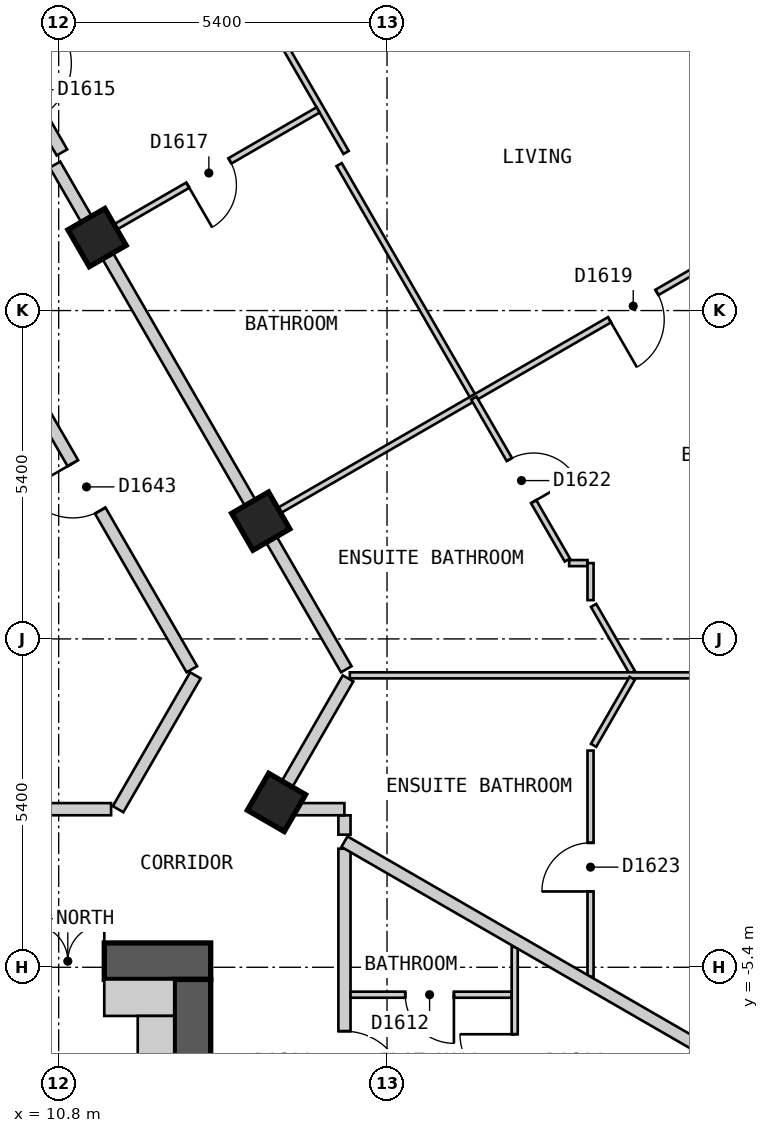
"""IFC4 building model, lengths in metres.
Left out: names, types, materials, properties, quantities, classifications, styles, units other than length and angle.
Written with IfcOpenShell. Run it as: python <this file> out.ifc"""

import sys

from ifc_helpers import new_model, si_unit, direction, frame, frame_2d, origin, origin_2d, place, context, subcontext, project, spatial, polyline, rectangle, outline, extrude, element, fill, save


model = new_model("IFC4")
c1 = context("Model", 3, precision=1e-05, world=origin(), true_north=direction((0.0, 1.0)))
c2 = subcontext(c1, "Body", "Model", "MODEL_VIEW")
j1 = project(units=[si_unit("LENGTHUNIT", "METRE"), si_unit("PLANEANGLEUNIT", "RADIAN")], contexts=[c1])
p1 = place(None, origin())
s1 = spatial("IfcSite", under=j1, at=p1, CompositionType="ELEMENT")
p2 = place(p1, origin())
s2 = spatial("IfcBuilding", under=s1, at=p2, CompositionType="ELEMENT")
p3 = place(p2, frame((0.0, 0.0, 163.2)))
s3 = spatial("IfcBuildingStorey", under=s2, at=p3, CompositionType="ELEMENT", Elevation=163.2)
for number, where, z_axis, x_axis in (
    (1, (14.382, -2.689, 0.0), (0.0, 0.0, 1.0), (0.5, 0.866, 0.0)),
    (2, (14.123, 1.937, 0.0), (0.0, 0.0, 1.0), (-0.5, 0.866, 0.0)),
    (3, (11.431, 6.6, 0.0), (0.0, 0.0, 1.0), (-0.5, 0.866, 0.0)),
):
    element("IfcColumn", number, at=place(p3, frame(where, z_axis=z_axis, x_axis=x_axis)), inside=s3, PredefinedType="COLUMN", context=c2, shape_type="SweptSolid", body=[
        extrude(rectangle(XDim=0.7, YDim=0.7, at=origin_2d()), origin(), (0.0, 0.0, 1.0), 3.0),
    ])
p4 = place(p3, frame((-13.3, -5.3, 0.0), z_axis=(0.0, 0.0, 1.0), x_axis=(1.0, 0.0, 0.0)))
e4 = element("IfcWall", 4, at=p4, inside=s3, PredefinedType="SHEAR", context=c2, shape_type="SweptSolid", body=[
    extrude(rectangle(XDim=26.6, YDim=0.6, at=frame_2d((13.3, 0.0))), origin(), (0.0, 0.0, 1.0), 2.7),
])
p5 = place(p4, frame((23.65, 0.0, 0.0)))
e5 = element("IfcOpeningElement", 5, at=p5, cuts=e4, PredefinedType="OPENING", context=c2, shape_type="SweptSolid", body=[
    extrude(rectangle(XDim=1.2, YDim=2.1, at=frame_2d((0.6, 1.05))), frame((0.0, 0.31, 0.0), z_axis=(0.0, -1.0, 0.0), x_axis=(1.0, 0.0, 0.0)), (0.0, 0.0, 1.0), 0.62),
])
p6 = place(p3, frame((13.0, -18.4, 0.0), z_axis=(0.0, 0.0, 1.0), x_axis=(0.0, 1.0, 0.0)))
e6 = element("IfcWall", 6, at=p6, inside=s3, PredefinedType="SHEAR", context=c2, shape_type="SweptSolid", body=[
    extrude(rectangle(XDim=12.8, YDim=0.6, at=frame_2d((6.4, 0.0))), origin(), (0.0, 0.0, 1.0), 2.7),
])
p7 = place(p3, frame((15.631, -21.025, 0.0), z_axis=(0.0, 0.0, 1.0), x_axis=(0.500018670445, 0.86601462413, 0.0)))
e7 = element("IfcWall", 7, at=p7, inside=s3, PredefinedType="SOLIDWALL", context=c2, shape_type="SweptSolid", body=[
    extrude(outline(polyline([(0.0, -0.15), (20.785, -0.15), (20.705, 0.15), (0.08, 0.15), (0.0, -0.15)])), origin(), (0.0, 0.0, 1.0), 2.7),
])
p8 = place(p7, frame((2.346, 0.0, 0.15)))
e8 = element("IfcOpeningElement", 8, at=p8, cuts=e7, PredefinedType="OPENING", context=c2, shape_type="SweptSolid", body=[
    extrude(rectangle(XDim=1.5, YDim=2.1, at=frame_2d((0.75, 1.05))), frame((0.0, 0.16, 0.0), z_axis=(0.0, -1.0, 0.0), x_axis=(1.0, 0.0, 0.0)), (0.0, 0.0, 1.0), 0.32),
])
p9 = place(p7, frame((7.21, 0.0, 0.15)))
e9 = element("IfcOpeningElement", 9, at=p9, cuts=e7, PredefinedType="OPENING", context=c2, shape_type="SweptSolid", body=[
    extrude(rectangle(XDim=1.5, YDim=2.1, at=frame_2d((0.75, 1.05))), frame((0.0, 0.16, 0.0), z_axis=(0.0, -1.0, 0.0), x_axis=(1.0, 0.0, 0.0)), (0.0, 0.0, 1.0), 0.32),
])
p10 = place(p7, frame((12.073, 0.0, 0.15)))
e10 = element("IfcOpeningElement", 10, at=p10, cuts=e7, PredefinedType="OPENING", context=c2, shape_type="SweptSolid", body=[
    extrude(rectangle(XDim=1.5, YDim=2.1, at=frame_2d((0.75, 1.05))), frame((0.0, 0.16, 0.0), z_axis=(0.0, -1.0, 0.0), x_axis=(1.0, 0.0, 0.0)), (0.0, 0.0, 1.0), 0.32),
])
p11 = place(p7, frame((16.938, 0.0, 0.15)))
e11 = element("IfcOpeningElement", 11, at=p11, cuts=e7, PredefinedType="OPENING", context=c2, shape_type="SweptSolid", body=[
    extrude(rectangle(XDim=1.5, YDim=2.1, at=frame_2d((0.75, 1.05))), frame((0.0, 0.16, 0.0), z_axis=(0.0, -1.0, 0.0), x_axis=(1.0, 0.0, 0.0)), (0.0, 0.0, 1.0), 0.32),
])
p12 = place(p3, frame((26.024, 1.825, 0.0), z_axis=(0.0, 0.0, 1.0), x_axis=(-0.500010537973, 0.866019319597, 0.0)))
e12 = element("IfcWall", 12, at=p12, inside=s3, PredefinedType="SOLIDWALL", context=c2, shape_type="SweptSolid", body=[
    extrude(outline(polyline([(0.0, -0.15), (22.863, -0.15), (22.783, 0.15), (0.08, 0.15), (0.0, -0.15)])), origin(), (0.0, 0.0, 1.0), 2.7),
])
p13 = place(p12, frame((2.606, 0.0, 0.15)))
e13 = element("IfcOpeningElement", 13, at=p13, cuts=e12, PredefinedType="OPENING", context=c2, shape_type="SweptSolid", body=[
    extrude(rectangle(XDim=1.5, YDim=2.1, at=frame_2d((0.75, 1.05))), frame((0.0, 0.16, 0.0), z_axis=(0.0, -1.0, 0.0), x_axis=(1.0, 0.0, 0.0)), (0.0, 0.0, 1.0), 0.32),
])
p14 = place(p12, frame((7.99, 0.0, 0.15)))
e14 = element("IfcOpeningElement", 14, at=p14, cuts=e12, PredefinedType="OPENING", context=c2, shape_type="SweptSolid", body=[
    extrude(rectangle(XDim=1.5, YDim=2.1, at=frame_2d((0.75, 1.05))), frame((0.0, 0.16, 0.0), z_axis=(0.0, -1.0, 0.0), x_axis=(1.0, 0.0, 0.0)), (0.0, 0.0, 1.0), 0.32),
])
p15 = place(p12, frame((13.373, 0.0, 0.15)))
e15 = element("IfcOpeningElement", 15, at=p15, cuts=e12, PredefinedType="OPENING", context=c2, shape_type="SweptSolid", body=[
    extrude(rectangle(XDim=1.5, YDim=2.1, at=frame_2d((0.75, 1.05))), frame((0.0, 0.16, 0.0), z_axis=(0.0, -1.0, 0.0), x_axis=(1.0, 0.0, 0.0)), (0.0, 0.0, 1.0), 0.32),
])
p16 = place(p12, frame((18.758, 0.0, 0.15)))
e16 = element("IfcOpeningElement", 16, at=p16, cuts=e12, PredefinedType="OPENING", context=c2, shape_type="SweptSolid", body=[
    extrude(rectangle(XDim=1.5, YDim=2.1, at=frame_2d((0.75, 1.05))), frame((0.0, 0.16, 0.0), z_axis=(0.0, -1.0, 0.0), x_axis=(1.0, 0.0, 0.0)), (0.0, 0.0, 1.0), 0.32),
])
p17 = place(p3, frame((9.526, 5.5, 0.0), z_axis=(0.0, 0.0, 1.0), x_axis=(0.500062092869, -0.865989551482, 0.0)))
e17 = element("IfcWall", 17, at=p17, inside=s3, PredefinedType="PARTITIONING", context=c2, shape_type="SweptSolid", body=[
    extrude(rectangle(XDim=6.927, YDim=0.2, at=frame_2d((3.464, 0.0))), origin(), (0.0, 0.0, 1.0), 2.7),
])
p18 = place(p17, frame((3.014, 0.0, 0.0)))
e18 = element("IfcOpeningElement", 18, at=p18, cuts=e17, PredefinedType="OPENING", context=c2, shape_type="SweptSolid", body=[
    extrude(rectangle(XDim=0.9, YDim=2.1, at=frame_2d((0.45, 1.05))), frame((0.0, 0.11, 0.0), z_axis=(0.0, -1.0, 0.0), x_axis=(1.0, 0.0, 0.0)), (0.0, 0.0, 1.0), 0.22),
])
p19 = place(p3, frame((10.739, 7.8, 0.0), z_axis=(0.0, 0.0, 1.0), x_axis=(0.499964311759, -0.86604600742, 0.0)))
e19 = element("IfcWall", 19, at=p19, inside=s3, PredefinedType="PARTITIONING", context=c2, shape_type="SweptSolid", body=[
    extrude(rectangle(XDim=9.583, YDim=0.2, at=frame_2d((4.792, 0.0))), origin(), (0.0, 0.0, 1.0), 2.7),
])
p20 = place(p3, frame((5.485, 17.3, 0.0), z_axis=(0.0, 0.0, 1.0), x_axis=(0.499965832213, -0.866045129667, 0.0)))
e20 = element("IfcWall", 20, at=p20, inside=s3, PredefinedType="PARTITIONING", context=c2, shape_type="SweptSolid", body=[
    extrude(rectangle(XDim=10.739, YDim=0.2, at=frame_2d((5.369, 0.0))), origin(), (0.0, 0.0, 1.0), 2.7),
])
p21 = place(p20, frame((9.047, 0.0, 0.0)))
e21 = element("IfcOpeningElement", 21, at=p21, cuts=e20, PredefinedType="OPENING", context=c2, shape_type="SweptSolid", body=[
    extrude(rectangle(XDim=1.0, YDim=2.1, at=frame_2d((0.5, 1.05))), frame((0.0, 0.11, 0.0), z_axis=(0.0, -1.0, 0.0), x_axis=(1.0, 0.0, 0.0)), (0.0, 0.0, 1.0), 0.22),
])
p22 = place(p3, frame((15.5, -2.901, 0.0), z_axis=(0.0, 0.0, 1.0), x_axis=(0.0, -1.0, 0.0)))
e22 = element("IfcWall", 22, at=p22, inside=s3, PredefinedType="PARTITIONING", context=c2, shape_type="SweptSolid", body=[
    extrude(rectangle(XDim=0.318, YDim=0.2, at=frame_2d((0.159, 0.0))), origin(), (0.0, 0.0, 1.0), 2.7),
])
p23 = place(p3, frame((7.028, -2.8, 0.0), z_axis=(0.0, 0.0, 1.0), x_axis=(1.0, 0.0, 0.0)))
e23 = element("IfcWall", 23, at=p23, inside=s3, PredefinedType="PARTITIONING", context=c2, shape_type="SweptSolid", body=[
    extrude(rectangle(XDim=4.634, YDim=0.2, at=frame_2d((2.317, 0.0))), origin(), (0.0, 0.0, 1.0), 2.7),
])
p24 = place(p3, frame((14.433, -2.8, 0.0), z_axis=(0.0, 0.0, 1.0), x_axis=(1.0, 0.0, 0.0)))
e24 = element("IfcWall", 24, at=p24, inside=s3, PredefinedType="PARTITIONING", context=c2, shape_type="SweptSolid", body=[
    extrude(rectangle(XDim=1.066, YDim=0.2, at=frame_2d((0.533, 0.0))), origin(), (0.0, 0.0, 1.0), 2.7),
])
p25 = place(p3, frame((11.777, -2.8, 0.0), z_axis=(0.0, 0.0, 1.0), x_axis=(0.500085537782, 0.86597601289, 0.0)))
e25 = element("IfcWall", 25, at=p25, inside=s3, PredefinedType="PARTITIONING", context=c2, shape_type="SweptSolid", body=[
    extrude(rectangle(XDim=2.542, YDim=0.2, at=frame_2d((1.271, 0.0))), origin(), (0.0, 0.0, 1.0), 2.7),
])
p26 = place(p3, frame((14.318, -2.8, 0.0), z_axis=(0.0, 0.0, 1.0), x_axis=(0.49970259524, 0.866197042428, 0.0)))
e26 = element("IfcWall", 26, at=p26, inside=s3, PredefinedType="PARTITIONING", context=c2, shape_type="SweptSolid", body=[
    extrude(rectangle(XDim=2.483, YDim=0.2, at=frame_2d((1.242, 0.0))), origin(), (0.0, 0.0, 1.0), 2.7),
])
p27 = place(p3, frame((15.5, -18.799, 0.0), z_axis=(0.0, 0.0, 1.0), x_axis=(0.0, 1.0, 0.0)))
e27 = element("IfcWall", 27, at=p27, inside=s3, PredefinedType="PARTITIONING", context=c2, shape_type="SweptSolid", body=[
    extrude(rectangle(XDim=15.349, YDim=0.2, at=frame_2d((7.675, 0.0))), origin(), (0.0, 0.0, 1.0), 2.7),
])
p28 = place(p27, frame((4.477, 0.0, 0.0)))
e28 = element("IfcOpeningElement", 28, at=p28, cuts=e27, PredefinedType="OPENING", context=c2, shape_type="SweptSolid", body=[
    extrude(rectangle(XDim=0.8, YDim=2.1, at=frame_2d((0.4, 1.05))), frame((0.0, 0.11, 0.0), z_axis=(0.0, -1.0, 0.0), x_axis=(1.0, 0.0, 0.0)), (0.0, 0.0, 1.0), 0.22),
])
p29 = place(p27, frame((11.348, 0.0, 0.0)))
e29 = element("IfcOpeningElement", 29, at=p29, cuts=e27, PredefinedType="OPENING", context=c2, shape_type="SweptSolid", body=[
    extrude(rectangle(XDim=1.0, YDim=2.1, at=frame_2d((0.5, 1.05))), frame((0.0, 0.11, 0.0), z_axis=(0.0, -1.0, 0.0), x_axis=(1.0, 0.0, 0.0)), (0.0, 0.0, 1.0), 0.22),
])
p30 = place(p3, frame((15.412, 7.8, 0.0), z_axis=(0.0, 0.0, 1.0), x_axis=(0.499882970317, -0.866092960361, 0.0)))
e30 = element("IfcWall", 30, at=p30, inside=s3, PredefinedType="PARTITIONING", context=c2, shape_type="SweptSolid", body=[
    extrude(rectangle(XDim=4.433, YDim=0.1, at=frame_2d((2.216, 0.0))), origin(), (0.0, 0.0, 1.0), 2.7),
])
p31 = place(p3, frame((19.597, 0.551, 0.0), z_axis=(0.0, 0.0, 1.0), x_axis=(0.499922110319, -0.866070368743, 0.0)))
e31 = element("IfcWall", 31, at=p31, inside=s3, PredefinedType="PARTITIONING", context=c2, shape_type="SweptSolid", body=[
    extrude(rectangle(XDim=1.27, YDim=0.1, at=frame_2d((0.635, 0.0))), origin(), (0.0, 0.0, 1.0), 2.7),
])
p32 = place(p3, frame((9.784, 17.947, 0.0), z_axis=(0.0, 0.0, 1.0), x_axis=(0.500016228266, -0.866016034188, 0.0)))
e32 = element("IfcWall", 32, at=p32, inside=s3, PredefinedType="PARTITIONING", context=c2, shape_type="SweptSolid", body=[
    extrude(rectangle(XDim=11.486, YDim=0.1, at=frame_2d((5.743, 0.0))), origin(), (0.0, 0.0, 1.0), 2.7),
])
p33 = place(p32, frame((7.518, 0.0, 0.0)))
e33 = element("IfcOpeningElement", 33, at=p33, cuts=e32, PredefinedType="OPENING", context=c2, shape_type="SweptSolid", body=[
    extrude(rectangle(XDim=0.9, YDim=2.1, at=frame_2d((0.45, 1.05))), frame((0.0, 0.06, 0.0), z_axis=(0.0, -1.0, 0.0), x_axis=(1.0, 0.0, 0.0)), (0.0, 0.0, 1.0), 0.12),
])
p34 = place(p3, frame((15.6, -5.851, 0.0), z_axis=(0.0, 0.0, 1.0), x_axis=(1.0, 0.0, 0.0)))
e34 = element("IfcWall", 34, at=p34, inside=s3, PredefinedType="PARTITIONING", context=c2, shape_type="SweptSolid", body=[
    extrude(rectangle(XDim=2.65, YDim=0.1, at=frame_2d((1.325, 0.0))), origin(), (0.0, 0.0, 1.0), 2.7),
])
p35 = place(p34, frame((0.9, 0.0, 0.0)))
e35 = element("IfcOpeningElement", 35, at=p35, cuts=e34, PredefinedType="OPENING", context=c2, shape_type="SweptSolid", body=[
    extrude(rectangle(XDim=0.8, YDim=2.1, at=frame_2d((0.4, 1.05))), frame((0.0, 0.06, 0.0), z_axis=(0.0, -1.0, 0.0), x_axis=(1.0, 0.0, 0.0)), (0.0, 0.0, 1.0), 0.12),
])
p36 = place(p3, frame((15.588, -0.599, 0.0), z_axis=(0.0, 0.0, 1.0), x_axis=(1.0, 0.0, 0.0)))
e36 = element("IfcWall", 36, at=p36, inside=s3, PredefinedType="PARTITIONING", context=c2, shape_type="SweptSolid", body=[
    extrude(rectangle(XDim=10.266, YDim=0.1, at=frame_2d((5.133, 0.0))), origin(), (0.0, 0.0, 1.0), 2.7),
])
p37 = place(p36, frame((7.135, 0.0, 0.0)))
e37 = element("IfcOpeningElement", 37, at=p37, cuts=e36, PredefinedType="OPENING", context=c2, shape_type="SweptSolid", body=[
    extrude(rectangle(XDim=0.9, YDim=2.1, at=frame_2d((0.45, 1.05))), frame((0.0, 0.06, 0.0), z_axis=(0.0, -1.0, 0.0), x_axis=(1.0, 0.0, 0.0)), (0.0, 0.0, 1.0), 0.12),
])
p38 = place(p3, frame((19.195, 1.247, 0.0), z_axis=(0.0, 0.0, 1.0), x_axis=(1.0, 0.0, 0.0)))
e38 = element("IfcWall", 38, at=p38, inside=s3, PredefinedType="PARTITIONING", context=c2, shape_type="SweptSolid", body=[
    extrude(rectangle(XDim=0.302, YDim=0.1, at=frame_2d((0.151, 0.0))), origin(), (0.0, 0.0, 1.0), 2.7),
])
p39 = place(p3, frame((19.597, -1.75, 0.0), z_axis=(0.0, 0.0, 1.0), x_axis=(0.499589422776, 0.866262320923, 0.0)))
e39 = element("IfcWall", 39, at=p39, inside=s3, PredefinedType="PARTITIONING", context=c2, shape_type="SweptSolid", body=[
    extrude(rectangle(XDim=1.271, YDim=0.1, at=frame_2d((0.635, 0.0))), origin(), (0.0, 0.0, 1.0), 2.7),
])
p40 = place(p3, frame((18.3, -10.452, 0.0), z_axis=(0.0, 0.0, 1.0), x_axis=(0.0, 1.0, 0.0)))
e40 = element("IfcWall", 40, at=p40, inside=s3, PredefinedType="PARTITIONING", context=c2, shape_type="SweptSolid", body=[
    extrude(rectangle(XDim=5.386, YDim=0.1, at=frame_2d((2.693, 0.0))), origin(), (0.0, 0.0, 1.0), 2.7),
])
p41 = place(p40, frame((3.051, 0.0, 0.0)))
e41 = element("IfcOpeningElement", 41, at=p41, cuts=e40, PredefinedType="OPENING", context=c2, shape_type="SweptSolid", body=[
    extrude(rectangle(XDim=0.9, YDim=2.1, at=frame_2d((0.45, 1.05))), frame((0.0, 0.06, 0.0), z_axis=(0.0, -1.0, 0.0), x_axis=(1.0, 0.0, 0.0)), (0.0, 0.0, 1.0), 0.12),
])
p42 = place(p3, frame((19.547, -5.555, 0.0), z_axis=(0.0, 0.0, 1.0), x_axis=(0.0, 1.0, 0.0)))
e42 = element("IfcWall", 42, at=p42, inside=s3, PredefinedType="PARTITIONING", context=c2, shape_type="SweptSolid", body=[
    extrude(rectangle(XDim=3.719, YDim=0.1, at=frame_2d((1.859, 0.0))), origin(), (0.0, 0.0, 1.0), 2.7),
])
p43 = place(p42, frame((1.402, 0.0, 0.0)))
e43 = element("IfcOpeningElement", 43, at=p43, cuts=e42, PredefinedType="OPENING", context=c2, shape_type="SweptSolid", body=[
    extrude(rectangle(XDim=0.8, YDim=2.1, at=frame_2d((0.4, 1.05))), frame((0.0, 0.06, 0.0), z_axis=(0.0, -1.0, 0.0), x_axis=(1.0, 0.0, 0.0)), (0.0, 0.0, 1.0), 0.12),
])
p44 = place(p3, frame((19.547, 0.638, 0.0), z_axis=(0.0, 0.0, 1.0), x_axis=(0.0, 1.0, 0.0)))
e44 = element("IfcWall", 44, at=p44, inside=s3, PredefinedType="PARTITIONING", context=c2, shape_type="SweptSolid", body=[
    extrude(rectangle(XDim=0.609, YDim=0.1, at=frame_2d((0.305, 0.0))), origin(), (0.0, 0.0, 1.0), 2.7),
])
p45 = place(p3, frame((14.21, 1.987, 0.0), z_axis=(0.0, 0.0, 1.0), x_axis=(0.866022959057, 0.500004234368, 0.0)))
e45 = element("IfcWall", 45, at=p45, inside=s3, PredefinedType="PARTITIONING", context=c2, shape_type="SweptSolid", body=[
    extrude(rectangle(XDim=10.0, YDim=0.1, at=frame_2d((5.0, 0.0))), origin(), (0.0, 0.0, 1.0), 2.7),
])
p46 = place(p45, frame((6.523, 0.0, 0.0)))
e46 = element("IfcOpeningElement", 46, at=p46, cuts=e45, PredefinedType="OPENING", context=c2, shape_type="SweptSolid", body=[
    extrude(rectangle(XDim=0.9, YDim=2.1, at=frame_2d((0.45, 1.05))), frame((0.0, 0.06, 0.0), z_axis=(0.0, -1.0, 0.0), x_axis=(1.0, 0.0, 0.0)), (0.0, 0.0, 1.0), 0.12),
])
p47 = place(p3, frame((11.518, 6.65, 0.0), z_axis=(0.0, 0.0, 1.0), x_axis=(0.865949381454, 0.500131651427, 0.0)))
e47 = element("IfcWall", 47, at=p47, inside=s3, PredefinedType="PARTITIONING", context=c2, shape_type="SweptSolid", body=[
    extrude(rectangle(XDim=4.097, YDim=0.1, at=frame_2d((2.049, 0.0))), origin(), (0.0, 0.0, 1.0), 2.7),
])
p48 = place(p47, frame((1.623, 0.0, 0.0)))
e48 = element("IfcOpeningElement", 48, at=p48, cuts=e47, PredefinedType="OPENING", context=c2, shape_type="SweptSolid", body=[
    extrude(rectangle(XDim=0.8, YDim=2.1, at=frame_2d((0.4, 1.05))), frame((0.0, 0.06, 0.0), z_axis=(0.0, -1.0, 0.0), x_axis=(1.0, 0.0, 0.0)), (0.0, 0.0, 1.0), 0.12),
])
p49 = place(p3, frame((15.5, -3.334, 0.0), z_axis=(0.0, 0.0, 1.0), x_axis=(0.866001896501, -0.5000407136, 0.0)))
e49 = element("IfcWall", 49, at=p49, inside=s3, PredefinedType="PARTITIONING", context=c2, shape_type="SweptSolid", body=[
    extrude(rectangle(XDim=8.809, YDim=0.2, at=frame_2d((4.405, 0.0))), origin(), (0.0, 0.0, 1.0), 2.7),
])
p50 = place(p3, frame((17.628, 3.961, 0.0), z_axis=(0.0, 0.0, 1.0), x_axis=(0.50003162148, -0.866007146345, 0.0)))
e50 = element("IfcWall", 50, at=p50, inside=s3, PredefinedType="PARTITIONING", context=c2, shape_type="SweptSolid", body=[
    extrude(rectangle(XDim=3.076, YDim=0.1, at=frame_2d((1.538, 0.0))), origin(), (0.0, 0.0, 1.0), 2.7),
])
p51 = place(p50, frame((1.167, 0.0, 0.0)))
e51 = element("IfcOpeningElement", 51, at=p51, cuts=e50, PredefinedType="OPENING", context=c2, shape_type="SweptSolid", body=[
    extrude(rectangle(XDim=0.8, YDim=2.1, at=frame_2d((0.4, 1.05))), frame((0.0, 0.06, 0.0), z_axis=(0.0, -1.0, 0.0), x_axis=(1.0, 0.0, 0.0)), (0.0, 0.0, 1.0), 0.12),
])
p52 = place(p3, frame((11.55, -5.9, 0.0), z_axis=(0.0, 0.0, 1.0), x_axis=(1.0, 0.0, 0.0)))
e52 = element("IfcWall", 52, at=p52, inside=s3, PredefinedType="PARTITIONING", context=c2, shape_type="SweptSolid", body=[
    extrude(rectangle(XDim=1.15, YDim=0.6, at=frame_2d((0.575, 0.0))), origin(), (0.0, 0.0, 1.0), 2.7),
])
p53 = place(p3, frame((12.4, -14.45, 0.0), z_axis=(0.0, 0.0, 1.0), x_axis=(0.0, 1.0, 0.0)))
e53 = element("IfcWall", 53, at=p53, inside=s3, PredefinedType="PARTITIONING", context=c2, shape_type="SweptSolid", body=[
    extrude(rectangle(XDim=8.25, YDim=0.6, at=frame_2d((4.125, 0.0))), origin(), (0.0, 0.0, 1.0), 2.7),
])
p54 = place(p29, origin())
e54 = element("IfcDoor", 54, at=p54, inside=s3, OperationType="SINGLE_SWING_LEFT", PredefinedType="DOOR", context=c2, shape_type="SweptSolid", body=[
    extrude(rectangle(XDim=1.0, YDim=2.1, at=frame_2d((0.5, 1.05))), frame((0.0, 0.025, 0.0), z_axis=(0.0, -1.0, 0.0), x_axis=(1.0, 0.0, 0.0)), (0.0, 0.0, 1.0), 0.05),
])
fill(e29, e54)
p55 = place(p35, origin())
e55 = element("IfcDoor", 55, at=p55, inside=s3, OperationType="SINGLE_SWING_RIGHT", PredefinedType="DOOR", context=c2, shape_type="SweptSolid", body=[
    extrude(rectangle(XDim=0.8, YDim=2.1, at=frame_2d((0.4, 1.05))), frame((0.0, 0.025, 0.0), z_axis=(0.0, -1.0, 0.0), x_axis=(1.0, 0.0, 0.0)), (0.0, 0.0, 1.0), 0.05),
])
fill(e35, e55)
p56 = place(p41, origin())
e56 = element("IfcDoor", 56, at=p56, inside=s3, OperationType="SINGLE_SWING_RIGHT", PredefinedType="DOOR", context=c2, shape_type="SweptSolid", body=[
    extrude(rectangle(XDim=0.9, YDim=2.1, at=frame_2d((0.45, 1.05))), frame((0.0, 0.025, 0.0), z_axis=(0.0, -1.0, 0.0), x_axis=(1.0, 0.0, 0.0)), (0.0, 0.0, 1.0), 0.05),
])
fill(e41, e56)
p57 = place(p48, origin())
e57 = element("IfcDoor", 57, at=p57, inside=s3, OperationType="SINGLE_SWING_LEFT", PredefinedType="DOOR", context=c2, shape_type="SweptSolid", body=[
    extrude(rectangle(XDim=0.8, YDim=2.1, at=frame_2d((0.4, 1.05))), frame((0.0, 0.025, 0.0), z_axis=(0.0, -1.0, 0.0), x_axis=(1.0, 0.0, 0.0)), (0.0, 0.0, 1.0), 0.05),
])
fill(e48, e57)
p58 = place(p46, origin())
e58 = element("IfcDoor", 58, at=p58, inside=s3, OperationType="SINGLE_SWING_LEFT", PredefinedType="DOOR", context=c2, shape_type="SweptSolid", body=[
    extrude(rectangle(XDim=0.9, YDim=2.1, at=frame_2d((0.45, 1.05))), frame((0.0, 0.025, 0.0), z_axis=(0.0, -1.0, 0.0), x_axis=(1.0, 0.0, 0.0)), (0.0, 0.0, 1.0), 0.05),
])
fill(e46, e58)
p59 = place(p51, origin())
e59 = element("IfcDoor", 59, at=p59, inside=s3, OperationType="SINGLE_SWING_RIGHT", PredefinedType="DOOR", context=c2, shape_type="SweptSolid", body=[
    extrude(rectangle(XDim=0.8, YDim=2.1, at=frame_2d((0.4, 1.05))), frame((0.0, 0.025, 0.0), z_axis=(0.0, -1.0, 0.0), x_axis=(1.0, 0.0, 0.0)), (0.0, 0.0, 1.0), 0.05),
])
fill(e51, e59)
p60 = place(p43, origin())
e60 = element("IfcDoor", 60, at=p60, inside=s3, OperationType="SINGLE_SWING_LEFT", PredefinedType="DOOR", context=c2, shape_type="SweptSolid", body=[
    extrude(rectangle(XDim=0.8, YDim=2.1, at=frame_2d((0.4, 1.05))), frame((0.0, 0.025, 0.0), z_axis=(0.0, -1.0, 0.0), x_axis=(1.0, 0.0, 0.0)), (0.0, 0.0, 1.0), 0.05),
])
fill(e43, e60)
p61 = place(p18, origin())
e61 = element("IfcDoor", 61, at=p61, inside=s3, OperationType="SINGLE_SWING_LEFT", PredefinedType="DOOR", context=c2, shape_type="SweptSolid", body=[
    extrude(rectangle(XDim=0.9, YDim=2.1, at=frame_2d((0.45, 1.05))), frame((0.0, 0.025, 0.0), z_axis=(0.0, -1.0, 0.0), x_axis=(1.0, 0.0, 0.0)), (0.0, 0.0, 1.0), 0.05),
])
fill(e18, e61)
p62 = place(p5, origin())
e62 = element("IfcDoor", 62, at=p62, inside=s3, OperationType="DOUBLE_DOOR_SINGLE_SWING", PredefinedType="DOOR", context=c2, shape_type="SweptSolid", body=[
    extrude(rectangle(XDim=1.2, YDim=2.1, at=frame_2d((0.6, 1.05))), frame((0.0, 0.025, 0.0), z_axis=(0.0, -1.0, 0.0), x_axis=(1.0, 0.0, 0.0)), (0.0, 0.0, 1.0), 0.05),
])
fill(e5, e62)
save(model, sys.argv[1])
